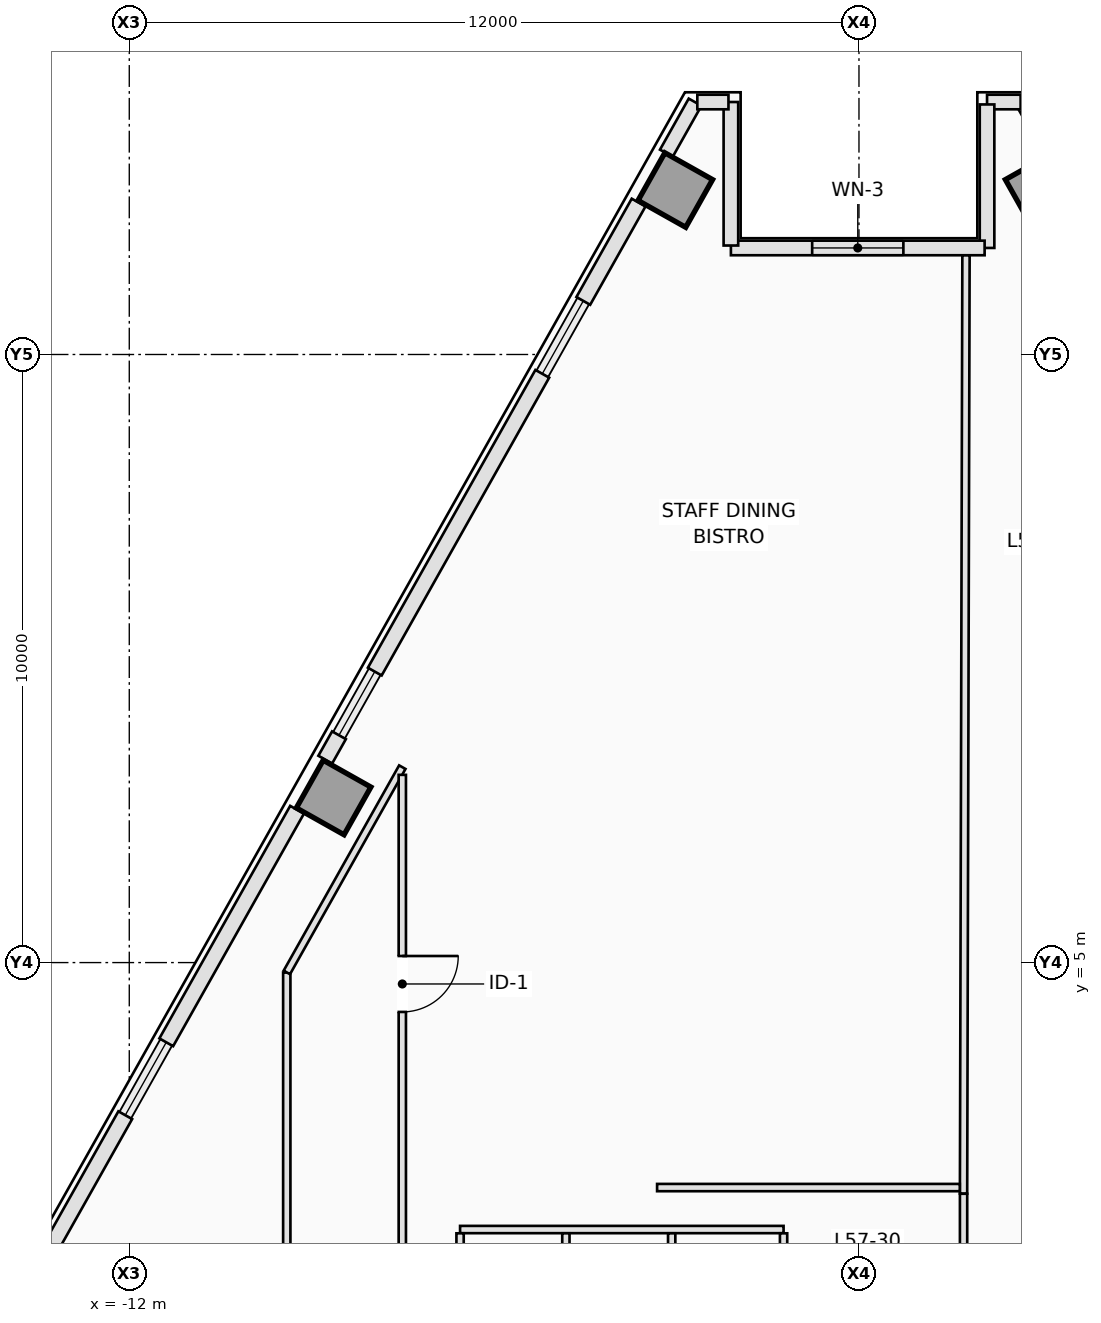
"""IFC4 building model, lengths in metres.
Left out: names, types, materials, properties, quantities, classifications, styles, units other than length and angle.
Written with IfcOpenShell. Run it as: python <this file> out.ifc"""

import sys

from ifc_helpers import new_model, si_unit, direction, frame, frame_2d, origin, origin_2d, place, context, subcontext, project, spatial, rectangle, extrude, element, fill, save


model = new_model("IFC4")
c1 = context("Model", 3, precision=1e-05, world=origin(), true_north=direction((0.0, 1.0)))
c2 = subcontext(c1, "Body", "Model", "MODEL_VIEW")
j1 = project(units=[si_unit("LENGTHUNIT", "METRE"), si_unit("PLANEANGLEUNIT", "RADIAN")], contexts=[c1])
p1 = place(None, origin())
s1 = spatial("IfcSite", under=j1, at=p1, CompositionType="ELEMENT")
p2 = place(p1, origin())
s2 = spatial("IfcBuilding", under=s1, at=p2, CompositionType="ELEMENT")
p3 = place(p2, frame((0.0, 0.0, 207.9)))
s3 = spatial("IfcBuildingStorey", under=s2, at=p3, CompositionType="ELEMENT", Elevation=207.9)
for number, where, z_axis, x_axis in (
    (1, (3.021, 17.704, 0.0), (0.0, 0.0, 1.0), (0.872, 0.49, 0.0)),
    (2, (-3.021, 17.704, 0.0), (0.0, 0.0, 1.0), (-0.872, 0.49, 0.0)),
    (3, (-8.64, 7.715, 0.0), (0.0, 0.0, 1.0), (-0.872, 0.49, 0.0)),
):
    element("IfcColumn", number, at=place(p3, frame(where, z_axis=z_axis, x_axis=x_axis)), inside=s3, PredefinedType="COLUMN", context=c2, shape_type="SweptSolid", body=[
        extrude(rectangle(XDim=0.9, YDim=0.9, at=origin_2d()), origin(), (0.0, 0.0, 1.0), 3.5),
    ])
for number, where, z_axis, x_axis in (
    (4, (2.695, 19.149, 0.0), (0.0, 0.0, 1.0), (0.49, -0.872, 0.0)),
    (5, (-3.168, 18.309, 0.0), (0.0, 0.0, 1.0), (0.49, 0.872, 0.0)),
):
    element("IfcWall", number, at=place(p3, frame(where, z_axis=z_axis, x_axis=x_axis)), inside=s3, PredefinedType="STANDARD", context=c2, shape_type="SweptSolid", body=[
        extrude(rectangle(XDim=0.964, YDim=0.24, at=frame_2d((0.482, 0.0))), origin(), (0.0, 0.0, 1.0), 3.25),
    ])
p4 = place(p3, frame((-8.777, 8.337, 0.0), z_axis=(0.0, 0.0, 1.0), x_axis=(0.490412424957, 0.871490478116, 0.0)))
e6 = element("IfcWall", 6, at=p4, inside=s3, PredefinedType="STANDARD", context=c2, shape_type="SweptSolid", body=[
    extrude(rectangle(XDim=0.46, YDim=0.26, at=frame_2d((0.23, 0.0))), origin(), (0.0, 0.0, 1.0), 3.25),
])
p5 = place(p3, frame((-7.962, 9.785, 0.0), z_axis=(0.0, 0.0, 1.0), x_axis=(0.490240608828, 0.871587141631, 0.0)))
e7 = element("IfcWall", 7, at=p5, inside=s3, PredefinedType="STANDARD", context=c2, shape_type="SweptSolid", body=[
    extrude(rectangle(XDim=5.618, YDim=0.26, at=frame_2d((2.809, 0.0))), origin(), (0.0, 0.0, 1.0), 3.25),
])
p6 = place(p3, frame((-4.533, 15.882, 0.0), z_axis=(0.0, 0.0, 1.0), x_axis=(0.490261239633, 0.871575537125, 0.0)))
e8 = element("IfcWall", 8, at=p6, inside=s3, PredefinedType="STANDARD", context=c2, shape_type="SweptSolid", body=[
    extrude(rectangle(XDim=1.855, YDim=0.26, at=frame_2d((0.928, 0.0))), origin(), (0.0, 0.0, 1.0), 3.25),
])
p7 = place(p3, frame((-14.217, -1.334, 0.0), z_axis=(0.0, 0.0, 1.0), x_axis=(0.490261239633, 0.871575537125, 0.0)))
e9 = element("IfcWall", 9, at=p7, inside=s3, PredefinedType="STANDARD", context=c2, shape_type="SweptSolid", body=[
    extrude(rectangle(XDim=4.388, YDim=0.26, at=frame_2d((2.194, 0.0))), origin(), (0.0, 0.0, 1.0), 3.25),
])
p8 = place(p3, frame((-11.392, 3.689, 0.0), z_axis=(0.0, 0.0, 1.0), x_axis=(0.490237464814, 0.871588910033, 0.0)))
e10 = element("IfcWall", 10, at=p8, inside=s3, PredefinedType="STANDARD", context=c2, shape_type="SweptSolid", body=[
    extrude(rectangle(XDim=4.388, YDim=0.26, at=frame_2d((2.194, 0.0))), origin(), (0.0, 0.0, 1.0), 3.25),
])
p9 = place(p3, frame((2.658, 19.152, 0.0), z_axis=(0.0, 0.0, 1.0), x_axis=(-1.0, 0.0, 0.0)))
e11 = element("IfcWall", 11, at=p9, inside=s3, PredefinedType="STANDARD", context=c2, shape_type="SweptSolid", body=[
    extrude(rectangle(XDim=0.552, YDim=0.24, at=frame_2d((0.276, 0.0))), origin(), (0.0, 0.0, 1.0), 3.25),
])
p10 = place(p3, frame((2.106, 19.112, 0.0), z_axis=(0.0, 0.0, 1.0), x_axis=(0.0, -1.0, 0.0)))
e12 = element("IfcWall", 12, at=p10, inside=s3, PredefinedType="STANDARD", context=c2, shape_type="SweptSolid", body=[
    extrude(rectangle(XDim=2.36, YDim=0.24, at=frame_2d((1.18, 0.0))), origin(), (0.0, 0.0, 1.0), 3.25),
])
p11 = place(p3, frame((2.066, 16.752, 0.0), z_axis=(0.0, 0.0, 1.0), x_axis=(-1.0, 0.0, 0.0)))
e13 = element("IfcWall", 13, at=p11, inside=s3, PredefinedType="STANDARD", context=c2, shape_type="SweptSolid", body=[
    extrude(rectangle(XDim=4.172, YDim=0.24, at=frame_2d((2.086, 0.0))), origin(), (0.0, 0.0, 1.0), 3.25),
])
p12 = place(p11, frame((1.336, 0.0, 0.9)))
e14 = element("IfcOpeningElement", 14, at=p12, cuts=e13, PredefinedType="OPENING", context=c2, shape_type="SweptSolid", body=[
    extrude(rectangle(XDim=1.5, YDim=1.95, at=frame_2d((0.75, 0.975))), frame((0.0, 0.13, 0.0), z_axis=(0.0, -1.0, 0.0), x_axis=(1.0, 0.0, 0.0)), (0.0, 0.0, 1.0), 0.26),
])
p13 = place(p3, frame((-2.106, 16.792, 0.0), z_axis=(0.0, 0.0, 1.0), x_axis=(0.0, 1.0, 0.0)))
e15 = element("IfcWall", 15, at=p13, inside=s3, PredefinedType="STANDARD", context=c2, shape_type="SweptSolid", body=[
    extrude(rectangle(XDim=2.36, YDim=0.24, at=frame_2d((1.18, 0.0))), origin(), (0.0, 0.0, 1.0), 3.25),
])
p14 = place(p3, frame((-2.146, 19.152, 0.0), z_axis=(0.0, 0.0, 1.0), x_axis=(-1.0, 0.0, 0.0)))
e16 = element("IfcWall", 16, at=p14, inside=s3, PredefinedType="STANDARD", context=c2, shape_type="SweptSolid", body=[
    extrude(rectangle(XDim=0.512, YDim=0.24, at=frame_2d((0.256, 0.0))), origin(), (0.0, 0.0, 1.0), 3.25),
])
p15 = place(p3, frame((-6.56, 0.61, 0.0), z_axis=(0.0, 0.0, 1.0), x_axis=(1.0, 0.0, 0.0)))
e17 = element("IfcWall", 17, at=p15, inside=s3, PredefinedType="PARTITIONING", context=c2, shape_type="SweptSolid", body=[
    extrude(rectangle(XDim=5.32, YDim=0.12, at=frame_2d((2.66, 0.0))), origin(), (0.0, 0.0, 1.0), 3.25),
])
for number, where, z_axis, x_axis in (
    (18, (-6.56, -2.378, 0.0), (0.0, 0.0, 1.0), (0.0, 1.0, 0.0)),
    (19, (-4.82, -2.378, 0.0), (0.0, 0.0, 1.0), (0.0, 1.0, 0.0)),
    (20, (-3.08, -2.378, 0.0), (0.0, 0.0, 1.0), (0.0, 1.0, 0.0)),
    (21, (-1.24, -2.378, 0.0), (0.0, 0.0, 1.0), (0.0, 1.0, 0.0)),
):
    element("IfcWall", number, at=place(p3, frame(where, z_axis=z_axis, x_axis=x_axis)), inside=s3, PredefinedType="PARTITIONING", context=c2, shape_type="SweptSolid", body=[
        extrude(rectangle(XDim=2.926, YDim=0.12, at=frame_2d((1.463, 0.0))), origin(), (0.0, 0.0, 1.0), 3.25),
    ])
p16 = place(p3, frame((-9.41, -2.338, 0.0), z_axis=(0.0, 0.0, 1.0), x_axis=(0.0, 1.0, 0.0)))
e22 = element("IfcWall", 22, at=p16, inside=s3, PredefinedType="PARTITIONING", context=c2, shape_type="SweptSolid", body=[
    extrude(rectangle(XDim=7.174, YDim=0.12, at=frame_2d((3.587, 0.0))), origin(), (0.0, 0.0, 1.0), 3.25),
])
p17 = place(p3, frame((-9.409, 4.838, 0.0), z_axis=(0.0, 0.0, 1.0), x_axis=(0.490276203052, 0.871567120032, 0.0)))
e23 = element("IfcWall", 23, at=p17, inside=s3, PredefinedType="PARTITIONING", context=c2, shape_type="SweptSolid", body=[
    extrude(rectangle(XDim=3.873, YDim=0.12, at=frame_2d((1.937, 0.0))), origin(), (0.0, 0.0, 1.0), 3.25),
])
p18 = place(p3, frame((-7.51, 8.087, 0.0), z_axis=(0.0, 0.0, 1.0), x_axis=(0.0, -1.0, 0.0)))
e24 = element("IfcWall", 24, at=p18, inside=s3, PredefinedType="PARTITIONING", context=c2, shape_type="SweptSolid", body=[
    extrude(rectangle(XDim=10.487, YDim=0.12, at=frame_2d((5.244, 0.0))), origin(), (0.0, 0.0, 1.0), 3.25),
])
p19 = place(p18, frame((2.979, 0.0, 0.0)))
e25 = element("IfcOpeningElement", 25, at=p19, cuts=e24, PredefinedType="OPENING", context=c2, shape_type="SweptSolid", body=[
    extrude(rectangle(XDim=0.92, YDim=2.12, at=frame_2d((0.46, 1.06))), frame((0.0, 0.07, 0.0), z_axis=(0.0, -1.0, 0.0), x_axis=(1.0, 0.0, 0.0)), (0.0, 0.0, 1.0), 0.14),
])
p20 = place(p3, frame((1.76, 16.63, 0.0), z_axis=(0.0, 0.0, 1.0), x_axis=(-0.002610750596, -0.999996591985, 0.0)))
e26 = element("IfcWall", 26, at=p20, inside=s3, PredefinedType="PARTITIONING", context=c2, shape_type="SweptSolid", body=[
    extrude(rectangle(XDim=15.43, YDim=0.12, at=frame_2d((7.715, 0.0))), origin(), (0.0, 0.0, 1.0), 3.25),
])
p21 = place(p3, frame((1.658, 1.3, 0.0), z_axis=(0.0, 0.0, 1.0), x_axis=(-1.0, 0.0, 0.0)))
e27 = element("IfcWall", 27, at=p21, inside=s3, PredefinedType="PARTITIONING", context=c2, shape_type="SweptSolid", body=[
    extrude(rectangle(XDim=4.978, YDim=0.12, at=frame_2d((2.489, 0.0))), origin(), (0.0, 0.0, 1.0), 2.943),
])
p22 = place(p3, frame((1.72, -2.29, 0.0), z_axis=(0.0, 0.0, 1.0), x_axis=(0.0, 1.0, 0.0)))
e28 = element("IfcWall", 28, at=p22, inside=s3, PredefinedType="PARTITIONING", context=c2, shape_type="SweptSolid", body=[
    extrude(rectangle(XDim=3.488, YDim=0.12, at=frame_2d((1.744, 0.0))), origin(), (0.0, 0.0, 1.0), 3.25),
])
p23 = place(p12, origin())
e29 = element("IfcWindow", 29, at=p23, inside=s3, PartitioningType="SINGLE_PANEL", PredefinedType="WINDOW", context=c2, shape_type="SweptSolid", body=[
    extrude(rectangle(XDim=1.5, YDim=1.95, at=frame_2d((0.75, 0.975))), frame((0.0, 0.03, 0.0), z_axis=(0.0, -1.0, 0.0), x_axis=(1.0, 0.0, 0.0)), (0.0, 0.0, 1.0), 0.06),
])
fill(e14, e29)
p24 = place(p19, origin())
e30 = element("IfcDoor", 30, at=p24, inside=s3, OperationType="SINGLE_SWING_LEFT", PredefinedType="DOOR", context=c2, shape_type="SweptSolid", body=[
    extrude(rectangle(XDim=0.92, YDim=2.12, at=frame_2d((0.46, 1.06))), frame((0.0, 0.025, 0.0), z_axis=(0.0, -1.0, 0.0), x_axis=(1.0, 0.0, 0.0)), (0.0, 0.0, 1.0), 0.05),
])
fill(e25, e30)
save(model, sys.argv[1])
